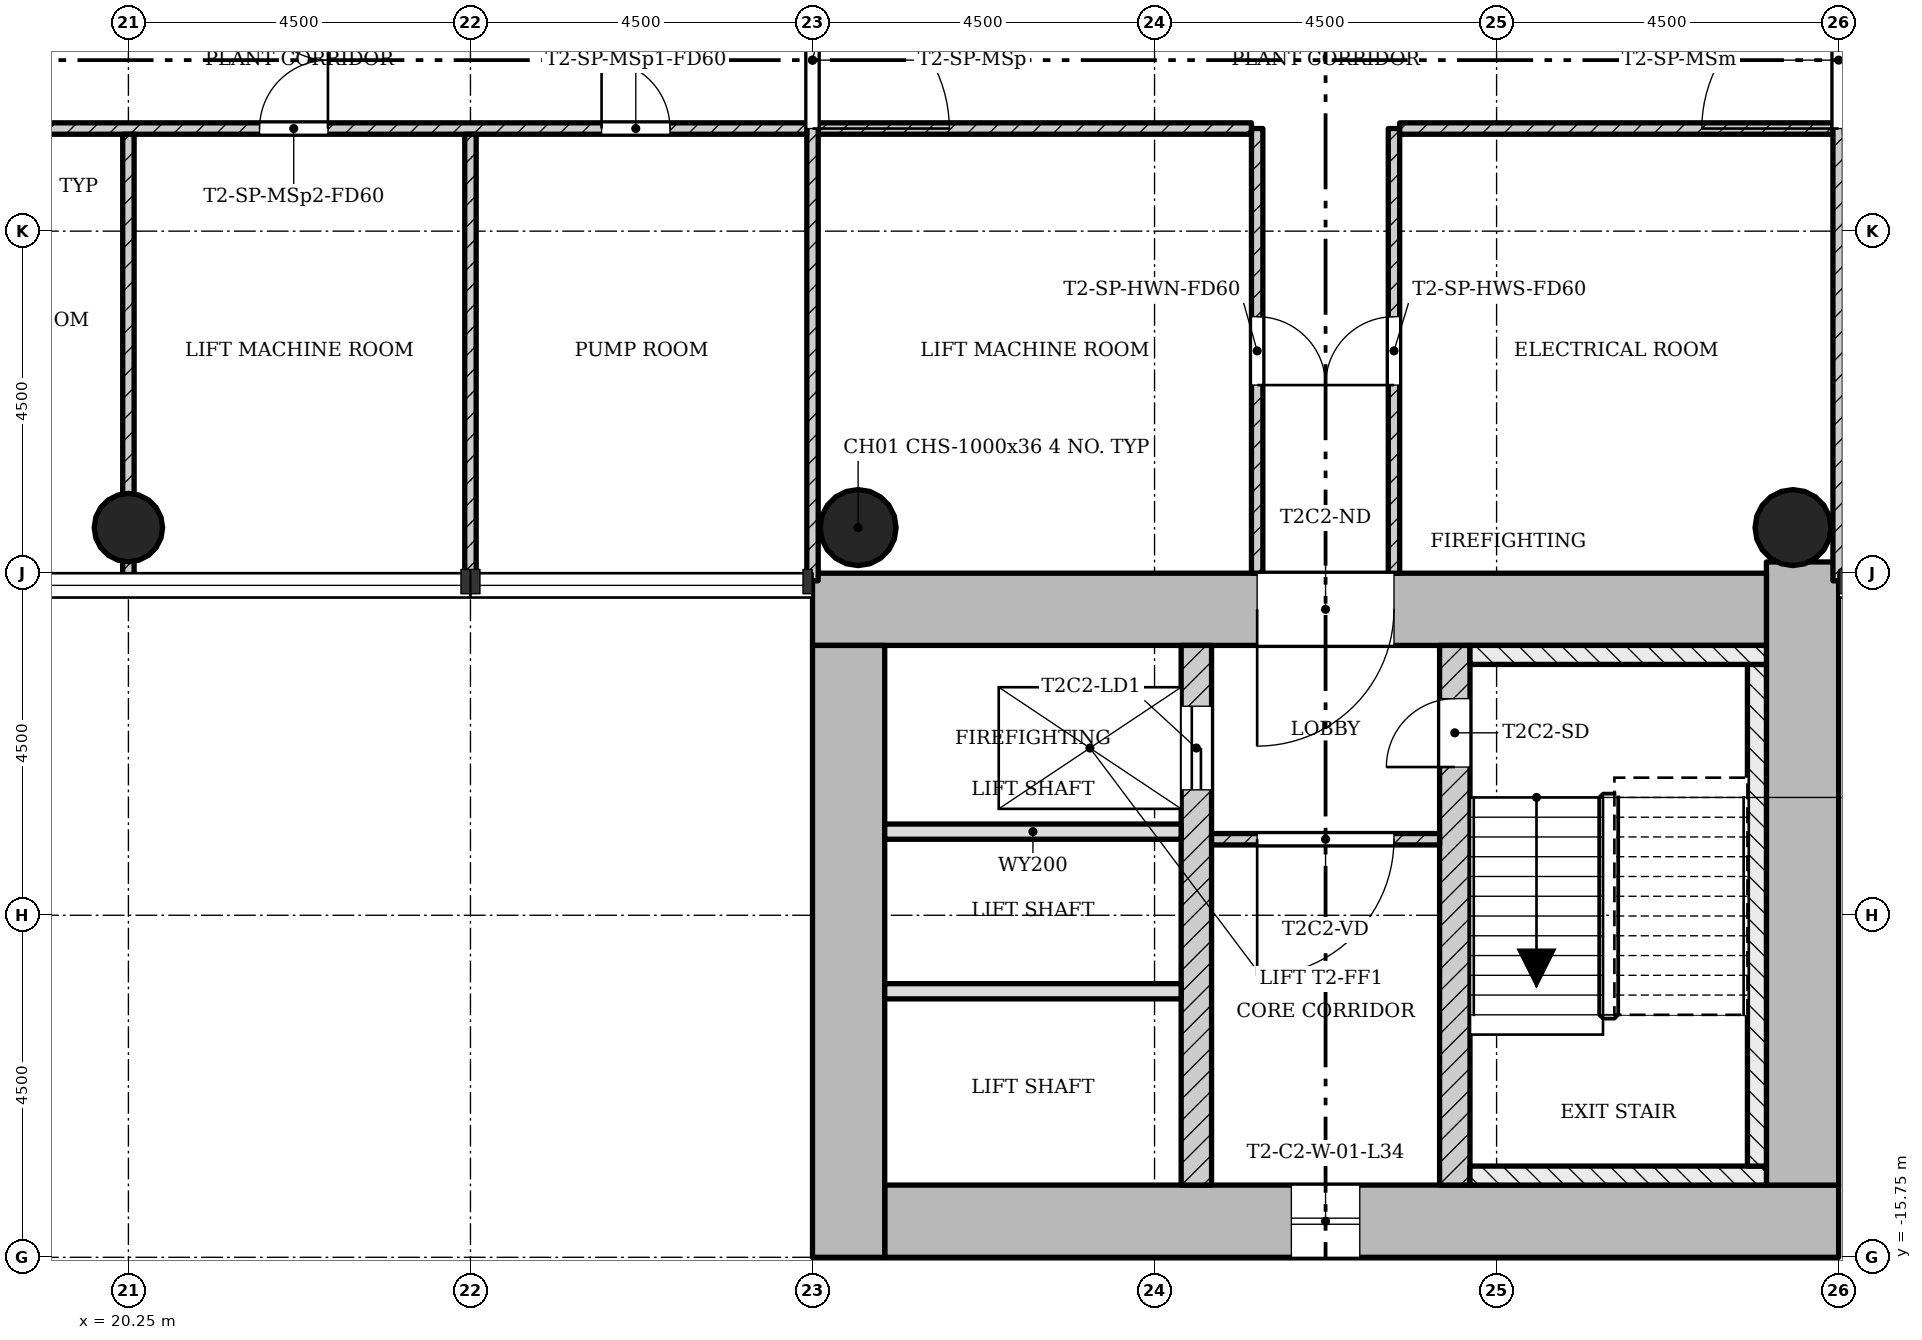
"""IFC4 building model, lengths in metres.
Left out: names, types, materials, properties, quantities, classifications, styles, units other than length and angle.
Written with IfcOpenShell. Run it as: python <this file> out.ifc"""

import sys

from ifc_helpers import new_model, si_unit, direction, frame, frame_2d, origin, origin_2d, place, context, subcontext, project, spatial, rectangle, hollow_circle, extrude, element, fill, save


model = new_model("IFC4")
c1 = context("Model", 3, precision=1e-05, world=origin(), true_north=direction((0.0, 1.0)))
c2 = subcontext(c1, "Body", "Model", "MODEL_VIEW")
j1 = project(units=[si_unit("LENGTHUNIT", "METRE"), si_unit("PLANEANGLEUNIT", "RADIAN")], contexts=[c1])
p1 = place(None, origin())
s1 = spatial("IfcSite", under=j1, at=p1, CompositionType="ELEMENT")
p2 = place(p1, origin())
s2 = spatial("IfcBuilding", under=s1, at=p2, CompositionType="ELEMENT")
p3 = place(p2, frame((0.0, 0.0, 124.2)))
s3 = spatial("IfcBuildingStorey", under=s2, at=p3, CompositionType="ELEMENT", Elevation=124.2)
p4 = place(p3, frame((30.2, -15.275, 0.0), z_axis=(0.0, 0.0, 1.0), x_axis=(1.0, 0.0, 0.0)))
e1 = element("IfcWall", 1, at=p4, inside=s3, PredefinedType="SHEAR", context=c2, shape_type="SweptSolid", body=[
    extrude(rectangle(XDim=12.55, YDim=0.95, at=frame_2d((6.275, 0.0))), origin(), (0.0, 0.0, 1.0), 4.5),
])
p5 = place(p4, frame((5.35, 0.0, 0.45)))
e2 = element("IfcOpeningElement", 2, at=p5, cuts=e1, PredefinedType="OPENING", context=c2, shape_type="SweptSolid", body=[
    extrude(rectangle(XDim=0.9, YDim=2.4, at=frame_2d((0.45, 1.2))), frame((0.0, 0.485, 0.0), z_axis=(0.0, -1.0, 0.0), x_axis=(1.0, 0.0, 0.0)), (0.0, 0.0, 1.0), 0.97),
])
p6 = place(p3, frame((42.275, -14.8, 0.0), z_axis=(0.0, 0.0, 1.0), x_axis=(0.0, 1.0, 0.0)))
e3 = element("IfcWall", 3, at=p6, inside=s3, PredefinedType="SHEAR", context=c2, shape_type="SweptSolid", body=[
    extrude(rectangle(XDim=8.198, YDim=0.95, at=frame_2d((4.099, 0.0))), origin(), (0.0, 0.0, 1.0), 4.5),
])
p7 = place(p3, frame((41.8, -7.225, 0.0), z_axis=(0.0, 0.0, 1.0), x_axis=(-1.0, 0.0, 0.0)))
e4 = element("IfcWall", 4, at=p7, inside=s3, PredefinedType="SHEAR", context=c2, shape_type="SweptSolid", body=[
    extrude(rectangle(XDim=12.55, YDim=0.95, at=frame_2d((6.275, 0.0))), origin(), (0.0, 0.0, 1.0), 4.5),
])
p8 = place(p7, frame((4.9, 0.0, 0.0)))
e5 = element("IfcOpeningElement", 5, at=p8, cuts=e4, PredefinedType="OPENING", context=c2, shape_type="SweptSolid", body=[
    extrude(rectangle(XDim=1.8, YDim=2.1, at=frame_2d((0.9, 1.05))), frame((0.0, 0.485, 0.0), z_axis=(0.0, -1.0, 0.0), x_axis=(1.0, 0.0, 0.0)), (0.0, 0.0, 1.0), 0.97),
])
p9 = place(p3, frame((29.725, -7.7, 0.0), z_axis=(0.0, 0.0, 1.0), x_axis=(0.0, -1.0, 0.0)))
e6 = element("IfcWall", 6, at=p9, inside=s3, PredefinedType="SHEAR", context=c2, shape_type="SweptSolid", body=[
    extrude(rectangle(XDim=8.05, YDim=0.95, at=frame_2d((4.025, 0.0))), origin(), (0.0, 0.0, 1.0), 4.5),
])
p10 = place(p3, frame((34.3, -14.8, 0.0), z_axis=(0.0, 0.0, 1.0), x_axis=(0.0, 1.0, 0.0)))
e7 = element("IfcWall", 7, at=p10, inside=s3, PredefinedType="SHEAR", context=c2, shape_type="SweptSolid", body=[
    extrude(rectangle(XDim=7.1, YDim=0.4, at=frame_2d((3.55, 0.0))), origin(), (0.0, 0.0, 1.0), 4.5),
])
p11 = place(p10, frame((5.2, 0.0, 0.0)))
e8 = element("IfcOpeningElement", 8, at=p11, cuts=e7, PredefinedType="OPENING", context=c2, shape_type="SweptSolid", body=[
    extrude(rectangle(XDim=1.1, YDim=2.1, at=frame_2d((0.55, 1.05))), frame((0.0, 0.21, 0.0), z_axis=(0.0, -1.0, 0.0), x_axis=(1.0, 0.0, 0.0)), (0.0, 0.0, 1.0), 0.42),
])
p12 = place(p3, frame((37.7, -14.8, 0.0), z_axis=(0.0, 0.0, 1.0), x_axis=(0.0, 1.0, 0.0)))
e9 = element("IfcWall", 9, at=p12, inside=s3, PredefinedType="SHEAR", context=c2, shape_type="SweptSolid", body=[
    extrude(rectangle(XDim=7.1, YDim=0.4, at=frame_2d((3.55, 0.0))), origin(), (0.0, 0.0, 1.0), 4.5),
])
p13 = place(p12, frame((5.5, 0.0, 0.0)))
e10 = element("IfcOpeningElement", 10, at=p13, cuts=e9, PredefinedType="OPENING", context=c2, shape_type="SweptSolid", body=[
    extrude(rectangle(XDim=0.9, YDim=2.1, at=frame_2d((0.45, 1.05))), frame((0.0, 0.21, 0.0), z_axis=(0.0, -1.0, 0.0), x_axis=(1.0, 0.0, 0.0)), (0.0, 0.0, 1.0), 0.42),
])
p14 = place(p3, frame((20.25, -6.15, 0.0), z_axis=(0.0, 0.0, 1.0), x_axis=(1.0, 0.0, 0.0)))
e11 = element("IfcColumn", 11, at=p14, inside=s3, PredefinedType="COLUMN", context=c2, shape_type="SweptSolid", body=[
    extrude(hollow_circle(Radius=0.45, WallThickness=0.032, at=origin_2d()), origin(), (0.0, 0.0, 1.0), 4.5),
])
for number, where, z_axis, x_axis in (
    (12, (42.15, -6.15, 0.0), (0.0, 0.0, 1.0), (1.0, 0.0, 0.0)),
    (13, (29.85, -6.15, 0.0), (0.0, 0.0, 1.0), (1.0, 0.0, 0.0)),
):
    element("IfcColumn", number, at=place(p3, frame(where, z_axis=z_axis, x_axis=x_axis)), inside=s3, PredefinedType="COLUMN", context=c2, shape_type="SweptSolid", body=[
        extrude(hollow_circle(Radius=0.5, WallThickness=0.036, at=origin_2d()), origin(), (0.0, 0.0, 1.0), 4.5),
    ])
p15 = place(p3, frame((34.5, -10.25, 0.0), z_axis=(0.0, 0.0, 1.0), x_axis=(1.0, 0.0, 0.0)))
e14 = element("IfcWall", 14, at=p15, inside=s3, PredefinedType="PARTITIONING", context=c2, shape_type="SweptSolid", body=[
    extrude(rectangle(XDim=3.0, YDim=0.15, at=frame_2d((1.5, 0.0))), origin(), (0.0, 0.0, 1.0), 4.1),
])
p16 = place(p15, frame((0.6, 0.0, 0.0)))
e15 = element("IfcOpeningElement", 15, at=p16, cuts=e14, PredefinedType="OPENING", context=c2, shape_type="SweptSolid", body=[
    extrude(rectangle(XDim=1.8, YDim=2.1, at=frame_2d((0.9, 1.05))), frame((0.0, 0.085, 0.0), z_axis=(0.0, -1.0, 0.0), x_axis=(1.0, 0.0, 0.0)), (0.0, 0.0, 1.0), 0.17),
])
for number, where, z_axis, x_axis in (
    (16, (30.2, -10.15, 0.0), (0.0, 0.0, 1.0), (1.0, 0.0, 0.0)),
    (17, (30.2, -12.25, 0.0), (0.0, 0.0, 1.0), (1.0, 0.0, 0.0)),
):
    element("IfcWall", number, at=place(p3, frame(where, z_axis=z_axis, x_axis=x_axis)), inside=s3, PredefinedType="SOLIDWALL", context=c2, shape_type="SweptSolid", body=[
        extrude(rectangle(XDim=3.9, YDim=0.2, at=frame_2d((1.95, 0.0))), origin(), (0.0, 0.0, 1.0), 4.1),
    ])
p17 = place(p3, frame((35.1, -6.75, 0.0), z_axis=(0.0, 0.0, 1.0), x_axis=(0.0, 1.0, 0.0)))
e18 = element("IfcWall", 18, at=p17, inside=s3, PredefinedType="PARTITIONING", context=c2, shape_type="SweptSolid", body=[
    extrude(rectangle(XDim=5.85, YDim=0.15, at=frame_2d((2.925, 0.0))), origin(), (0.0, 0.0, 1.0), 4.1),
])
p18 = place(p17, frame((2.475, 0.0, 0.0)))
e19 = element("IfcOpeningElement", 19, at=p18, cuts=e18, PredefinedType="OPENING", context=c2, shape_type="SweptSolid", body=[
    extrude(rectangle(XDim=0.9, YDim=2.1, at=frame_2d((0.45, 1.05))), frame((0.0, 0.085, 0.0), z_axis=(0.0, -1.0, 0.0), x_axis=(1.0, 0.0, 0.0)), (0.0, 0.0, 1.0), 0.17),
])
p19 = place(p3, frame((35.025, -0.9, 0.0), z_axis=(0.0, 0.0, 1.0), x_axis=(-1.0, 0.0, 0.0)))
e20 = element("IfcWall", 20, at=p19, inside=s3, PredefinedType="PARTITIONING", context=c2, shape_type="SweptSolid", body=[
    extrude(rectangle(XDim=5.7, YDim=0.15, at=frame_2d((2.85, 0.0))), origin(), (0.0, 0.0, 1.0), 4.1),
])
p20 = place(p3, frame((36.9, -6.75, 0.0), z_axis=(0.0, 0.0, 1.0), x_axis=(0.0, 1.0, 0.0)))
e21 = element("IfcWall", 21, at=p20, inside=s3, PredefinedType="PARTITIONING", context=c2, shape_type="SweptSolid", body=[
    extrude(rectangle(XDim=5.85, YDim=0.15, at=frame_2d((2.925, 0.0))), origin(), (0.0, 0.0, 1.0), 4.1),
])
p21 = place(p20, frame((2.475, 0.0, 0.0)))
e22 = element("IfcOpeningElement", 22, at=p21, cuts=e21, PredefinedType="OPENING", context=c2, shape_type="SweptSolid", body=[
    extrude(rectangle(XDim=0.9, YDim=2.1, at=frame_2d((0.45, 1.05))), frame((0.0, 0.085, 0.0), z_axis=(0.0, -1.0, 0.0), x_axis=(1.0, 0.0, 0.0)), (0.0, 0.0, 1.0), 0.17),
])
p22 = place(p3, frame((42.675, -0.9, 0.0), z_axis=(0.0, 0.0, 1.0), x_axis=(-1.0, 0.0, 0.0)))
e23 = element("IfcWall", 23, at=p22, inside=s3, PredefinedType="PARTITIONING", context=c2, shape_type="SweptSolid", body=[
    extrude(rectangle(XDim=5.7, YDim=0.15, at=frame_2d((2.85, 0.0))), origin(), (0.0, 0.0, 1.0), 4.1),
])
p23 = place(p3, frame((29.25, -6.85, 0.0), z_axis=(0.0, 0.0, 1.0), x_axis=(0.0, 1.0, 0.0)))
e24 = element("IfcWall", 24, at=p23, inside=s3, PredefinedType="PARTITIONING", context=c2, shape_type="SweptSolid", body=[
    extrude(rectangle(XDim=13.7, YDim=0.15, at=frame_2d((6.85, 0.0))), origin(), (0.0, 0.0, 1.0), 4.1),
])
p24 = place(p23, frame((5.95, 0.0, 0.0)))
e25 = element("IfcOpeningElement", 25, at=p24, cuts=e24, PredefinedType="OPENING", context=c2, shape_type="SweptSolid", body=[
    extrude(rectangle(XDim=1.8, YDim=2.1, at=frame_2d((0.9, 1.05))), frame((0.0, 0.085, 0.0), z_axis=(0.0, -1.0, 0.0), x_axis=(1.0, 0.0, 0.0)), (0.0, 0.0, 1.0), 0.17),
])
p25 = place(p3, frame((29.175, -0.9, 0.0), z_axis=(0.0, 0.0, 1.0), x_axis=(-1.0, 0.0, 0.0)))
e26 = element("IfcWall", 26, at=p25, inside=s3, PredefinedType="PARTITIONING", context=c2, shape_type="SweptSolid", body=[
    extrude(rectangle(XDim=13.525, YDim=0.15, at=frame_2d((6.763, 0.0))), origin(), (0.0, 0.0, 1.0), 4.1),
])
p26 = place(p25, frame((1.8, 0.0, 0.0)))
e27 = element("IfcOpeningElement", 27, at=p26, cuts=e26, PredefinedType="OPENING", context=c2, shape_type="SweptSolid", body=[
    extrude(rectangle(XDim=0.9, YDim=2.1, at=frame_2d((0.45, 1.05))), frame((0.0, 0.085, 0.0), z_axis=(0.0, -1.0, 0.0), x_axis=(1.0, 0.0, 0.0)), (0.0, 0.0, 1.0), 0.17),
])
p27 = place(p25, frame((6.3, 0.0, 0.0)))
e28 = element("IfcOpeningElement", 28, at=p27, cuts=e26, PredefinedType="OPENING", context=c2, shape_type="SweptSolid", body=[
    extrude(rectangle(XDim=0.9, YDim=2.1, at=frame_2d((0.45, 1.05))), frame((0.0, 0.085, 0.0), z_axis=(0.0, -1.0, 0.0), x_axis=(1.0, 0.0, 0.0)), (0.0, 0.0, 1.0), 0.17),
])
p28 = place(p25, frame((10.8, 0.0, 0.0)))
e29 = element("IfcOpeningElement", 29, at=p28, cuts=e26, PredefinedType="OPENING", context=c2, shape_type="SweptSolid", body=[
    extrude(rectangle(XDim=0.9, YDim=2.1, at=frame_2d((0.45, 1.05))), frame((0.0, 0.085, 0.0), z_axis=(0.0, -1.0, 0.0), x_axis=(1.0, 0.0, 0.0)), (0.0, 0.0, 1.0), 0.17),
])
for number, where, z_axis, x_axis in (
    (30, (24.75, -0.975, 0.0), (0.0, 0.0, 1.0), (0.0, -1.0, 0.0)),
    (31, (20.25, -0.975, 0.0), (0.0, 0.0, 1.0), (0.0, -1.0, 0.0)),
):
    element("IfcWall", number, at=place(p3, frame(where, z_axis=z_axis, x_axis=x_axis)), inside=s3, PredefinedType="PARTITIONING", context=c2, shape_type="SweptSolid", body=[
        extrude(rectangle(XDim=5.875, YDim=0.15, at=frame_2d((2.938, 0.0))), origin(), (0.0, 0.0, 1.0), 4.1),
    ])
p29 = place(p3, frame((42.75, -6.85, 0.0), z_axis=(0.0, 0.0, 1.0), x_axis=(0.0, 1.0, 0.0)))
e32 = element("IfcWall", 32, at=p29, inside=s3, PredefinedType="PARTITIONING", context=c2, shape_type="SweptSolid", body=[
    extrude(rectangle(XDim=13.7, YDim=0.15, at=frame_2d((6.85, 0.0))), origin(), (0.0, 0.0, 1.0), 4.1),
])
p30 = place(p29, frame((5.95, 0.0, 0.0)))
e33 = element("IfcOpeningElement", 33, at=p30, cuts=e32, PredefinedType="OPENING", context=c2, shape_type="SweptSolid", body=[
    extrude(rectangle(XDim=1.8, YDim=2.1, at=frame_2d((0.9, 1.05))), frame((0.0, 0.085, 0.0), z_axis=(0.0, -1.0, 0.0), x_axis=(1.0, 0.0, 0.0)), (0.0, 0.0, 1.0), 0.17),
])
p31 = place(p3, frame((37.9, -14.675, 0.0), z_axis=(0.0, 0.0, 1.0), x_axis=(1.0, 0.0, 0.0)))
e34 = element("IfcWall", 34, at=p31, inside=s3, PredefinedType="SHEAR", context=c2, shape_type="SweptSolid", body=[
    extrude(rectangle(XDim=3.9, YDim=0.25, at=frame_2d((1.95, 0.0))), origin(), (0.0, 0.0, 1.0), 4.5),
])
p32 = place(p3, frame((41.675, -7.95, 0.0), z_axis=(0.0, 0.0, 1.0), x_axis=(0.0, -1.0, 0.0)))
e35 = element("IfcWall", 35, at=p32, inside=s3, PredefinedType="SHEAR", context=c2, shape_type="SweptSolid", body=[
    extrude(rectangle(XDim=6.6, YDim=0.25, at=frame_2d((3.3, 0.0))), origin(), (0.0, 0.0, 1.0), 4.5),
])
p33 = place(p3, frame((37.9, -7.825, 0.0), z_axis=(0.0, 0.0, 1.0), x_axis=(1.0, 0.0, 0.0)))
e36 = element("IfcWall", 36, at=p33, inside=s3, PredefinedType="SHEAR", context=c2, shape_type="SweptSolid", body=[
    extrude(rectangle(XDim=3.9, YDim=0.25, at=frame_2d((1.95, 0.0))), origin(), (0.0, 0.0, 1.0), 4.5),
])
p34 = place(p5, origin())
e37 = element("IfcWindow", 37, at=p34, inside=s3, PartitioningType="SINGLE_PANEL", PredefinedType="WINDOW", context=c2, shape_type="SweptSolid", body=[
    extrude(rectangle(XDim=0.9, YDim=2.4, at=frame_2d((0.45, 1.2))), frame((0.0, 0.03, 0.0), z_axis=(0.0, -1.0, 0.0), x_axis=(1.0, 0.0, 0.0)), (0.0, 0.0, 1.0), 0.06),
])
fill(e2, e37)
p35 = place(p16, origin())
e38 = element("IfcDoor", 38, at=p35, inside=s3, OperationType="SINGLE_SWING_LEFT", PredefinedType="DOOR", context=c2, shape_type="SweptSolid", body=[
    extrude(rectangle(XDim=1.8, YDim=2.1, at=frame_2d((0.9, 1.05))), frame((0.0, 0.025, 0.0), z_axis=(0.0, -1.0, 0.0), x_axis=(1.0, 0.0, 0.0)), (0.0, 0.0, 1.0), 0.05),
])
fill(e15, e38)
p36 = place(p18, origin())
e39 = element("IfcDoor", 39, at=p36, inside=s3, OperationType="SINGLE_SWING_LEFT", PredefinedType="DOOR", context=c2, shape_type="SweptSolid", body=[
    extrude(rectangle(XDim=0.9, YDim=2.1, at=frame_2d((0.45, 1.05))), frame((0.0, 0.025, 0.0), z_axis=(0.0, -1.0, 0.0), x_axis=(1.0, 0.0, 0.0)), (0.0, 0.0, 1.0), 0.05),
])
fill(e19, e39)
p37 = place(p21, origin())
e40 = element("IfcDoor", 40, at=p37, inside=s3, OperationType="SINGLE_SWING_RIGHT", PredefinedType="DOOR", context=c2, shape_type="SweptSolid", body=[
    extrude(rectangle(XDim=0.9, YDim=2.1, at=frame_2d((0.45, 1.05))), frame((0.0, 0.025, 0.0), z_axis=(0.0, -1.0, 0.0), x_axis=(1.0, 0.0, 0.0)), (0.0, 0.0, 1.0), 0.05),
])
fill(e22, e40)
p38 = place(p24, origin())
e41 = element("IfcDoor", 41, at=p38, inside=s3, OperationType="SINGLE_SWING_LEFT", PredefinedType="DOOR", context=c2, shape_type="SweptSolid", body=[
    extrude(rectangle(XDim=1.8, YDim=2.1, at=frame_2d((0.9, 1.05))), frame((0.0, 0.025, 0.0), z_axis=(0.0, -1.0, 0.0), x_axis=(1.0, 0.0, 0.0)), (0.0, 0.0, 1.0), 0.05),
])
fill(e25, e41)
p39 = place(p26, origin())
e42 = element("IfcDoor", 42, at=p39, inside=s3, OperationType="SINGLE_SWING_RIGHT", PredefinedType="DOOR", context=c2, shape_type="SweptSolid", body=[
    extrude(rectangle(XDim=0.9, YDim=2.1, at=frame_2d((0.45, 1.05))), frame((0.0, 0.025, 0.0), z_axis=(0.0, -1.0, 0.0), x_axis=(1.0, 0.0, 0.0)), (0.0, 0.0, 1.0), 0.05),
])
fill(e27, e42)
p40 = place(p27, origin())
e43 = element("IfcDoor", 43, at=p40, inside=s3, OperationType="SINGLE_SWING_LEFT", PredefinedType="DOOR", context=c2, shape_type="SweptSolid", body=[
    extrude(rectangle(XDim=0.9, YDim=2.1, at=frame_2d((0.45, 1.05))), frame((0.0, 0.025, 0.0), z_axis=(0.0, -1.0, 0.0), x_axis=(1.0, 0.0, 0.0)), (0.0, 0.0, 1.0), 0.05),
])
fill(e28, e43)
p41 = place(p30, origin())
e44 = element("IfcDoor", 44, at=p41, inside=s3, OperationType="SINGLE_SWING_RIGHT", PredefinedType="DOOR", context=c2, shape_type="SweptSolid", body=[
    extrude(rectangle(XDim=1.8, YDim=2.1, at=frame_2d((0.9, 1.05))), frame((0.0, 0.025, 0.0), z_axis=(0.0, -1.0, 0.0), x_axis=(1.0, 0.0, 0.0)), (0.0, 0.0, 1.0), 0.05),
])
fill(e33, e44)
p42 = place(p13, origin())
e45 = element("IfcDoor", 45, at=p42, inside=s3, OperationType="SINGLE_SWING_RIGHT", PredefinedType="DOOR", context=c2, shape_type="SweptSolid", body=[
    extrude(rectangle(XDim=0.9, YDim=2.1, at=frame_2d((0.45, 1.05))), frame((0.0, 0.025, 0.0), z_axis=(0.0, -1.0, 0.0), x_axis=(1.0, 0.0, 0.0)), (0.0, 0.0, 1.0), 0.05),
])
fill(e10, e45)
p43 = place(p11, origin())
e46 = element("IfcDoor", 46, at=p43, inside=s3, OperationType="SLIDING_TO_LEFT", PredefinedType="DOOR", context=c2, shape_type="SweptSolid", body=[
    extrude(rectangle(XDim=1.1, YDim=2.1, at=frame_2d((0.55, 1.05))), frame((0.0, 0.025, 0.0), z_axis=(0.0, -1.0, 0.0), x_axis=(1.0, 0.0, 0.0)), (0.0, 0.0, 1.0), 0.05),
])
fill(e8, e46)
p44 = place(p8, origin())
e47 = element("IfcDoor", 47, at=p44, inside=s3, OperationType="SINGLE_SWING_LEFT", PredefinedType="DOOR", context=c2, shape_type="SweptSolid", body=[
    extrude(rectangle(XDim=1.8, YDim=2.1, at=frame_2d((0.9, 1.05))), frame((0.0, 0.025, 0.0), z_axis=(0.0, -1.0, 0.0), x_axis=(1.0, 0.0, 0.0)), (0.0, 0.0, 1.0), 0.05),
])
fill(e5, e47)
save(model, sys.argv[1])
